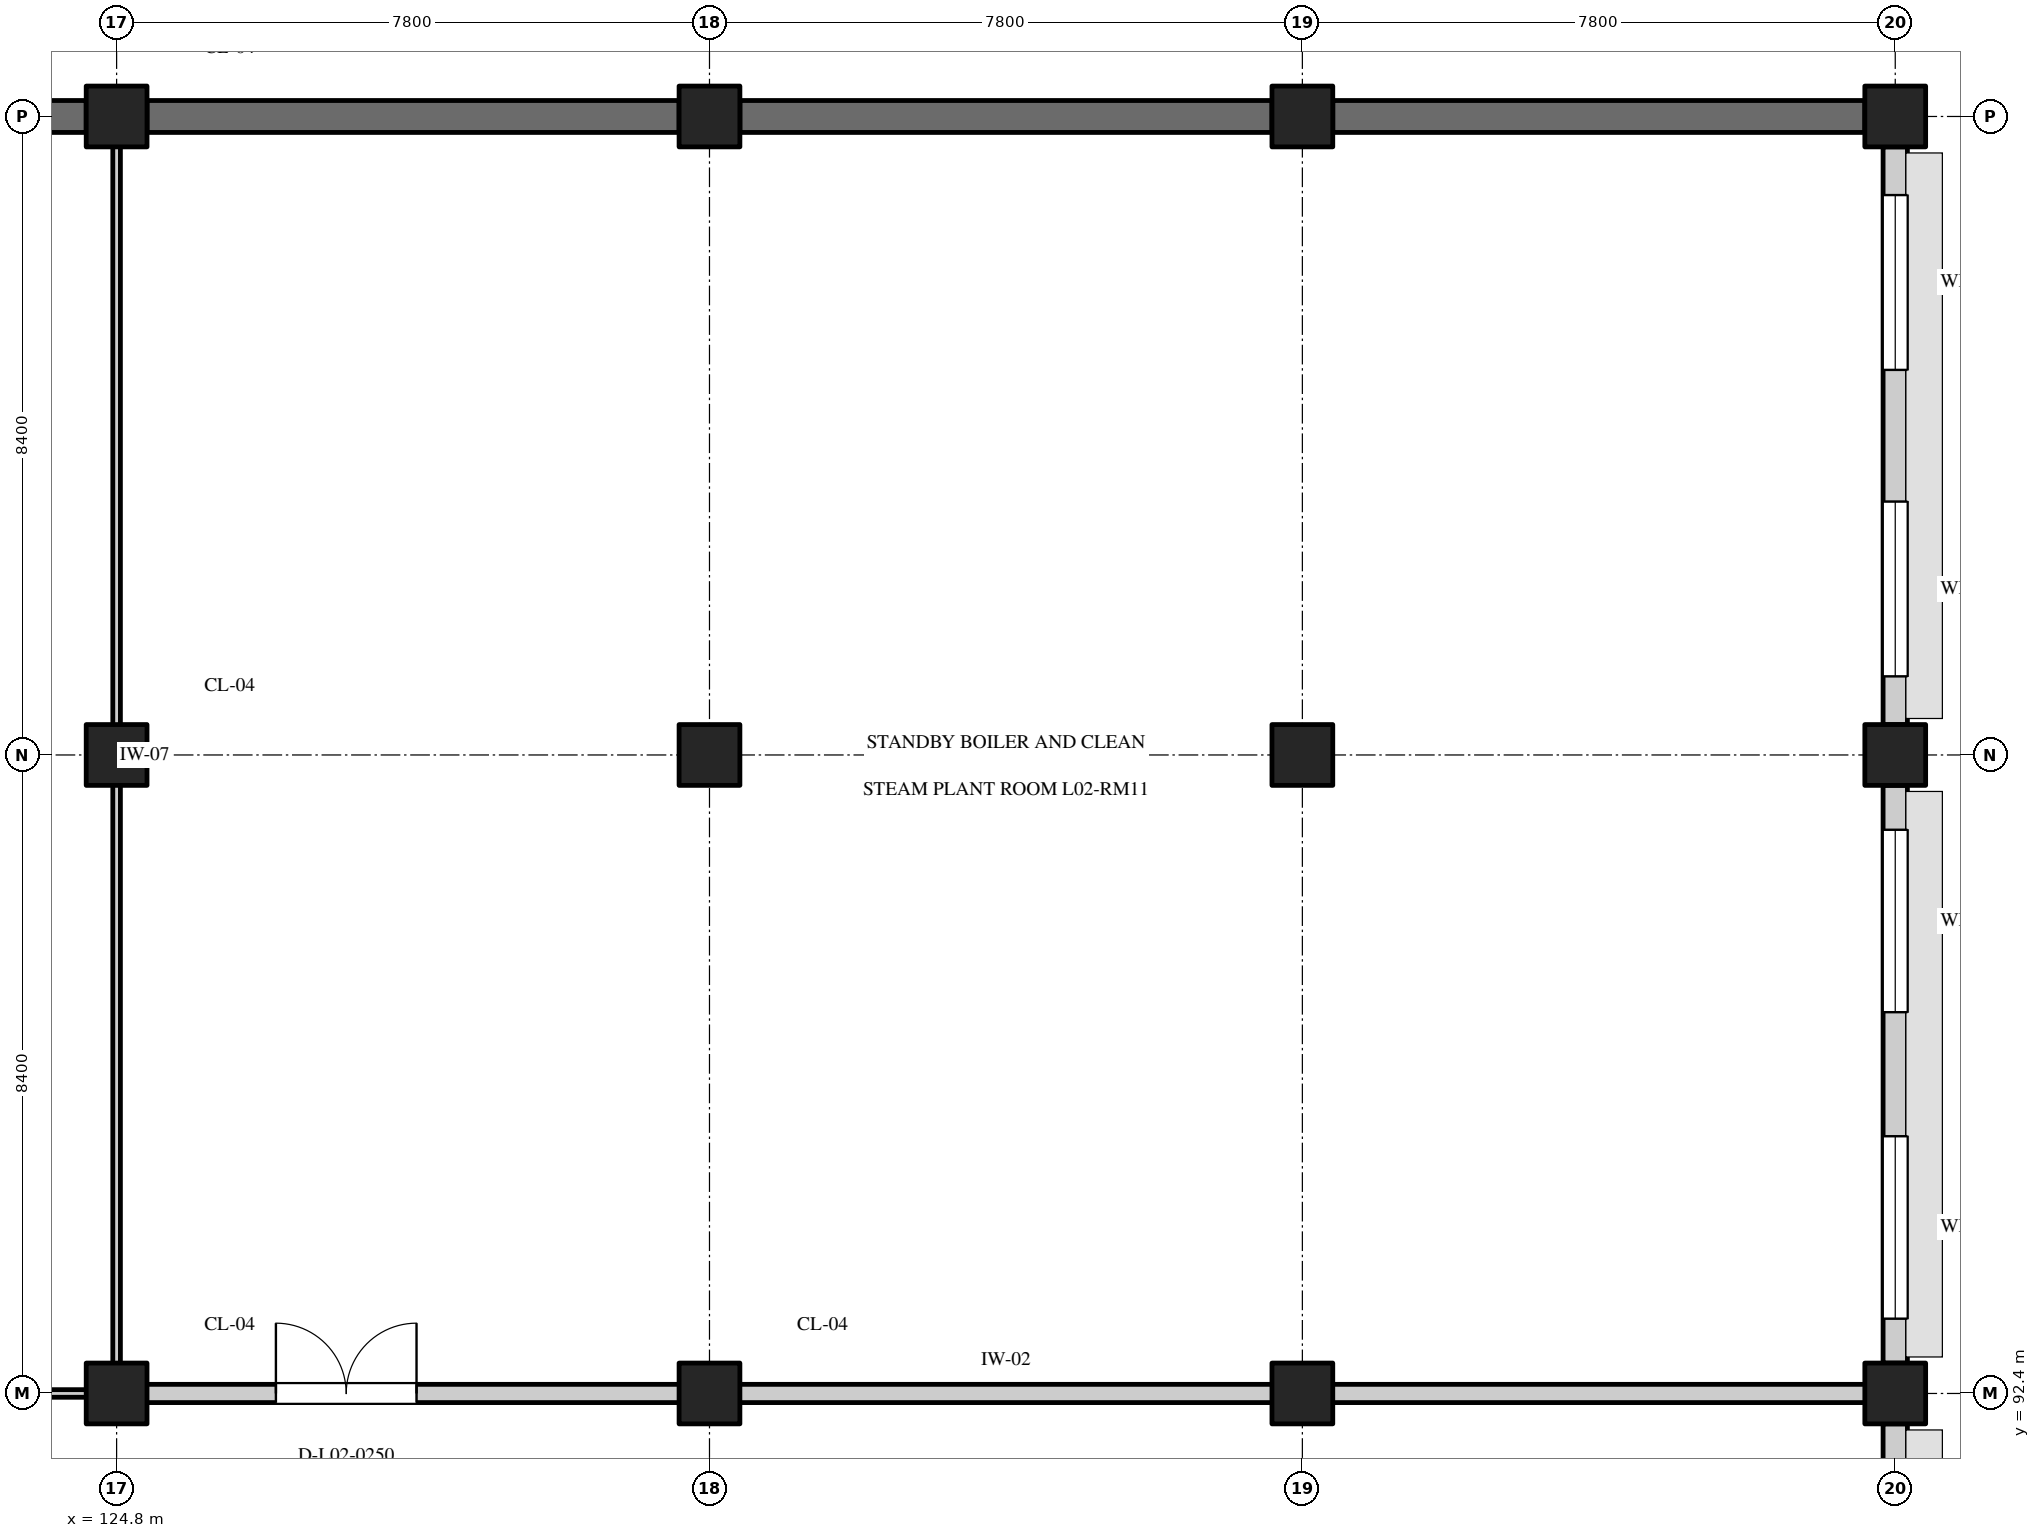
"""IFC4 building model, lengths in metres.
Left out: names, types, materials, properties, quantities, classifications, styles, units other than length and angle.
Written with IfcOpenShell. Run it as: python <this file> out.ifc"""

import sys

from ifc_helpers import new_model, si_unit, direction, frame, frame_2d, origin, origin_2d, place, context, subcontext, project, spatial, rectangle, extrude, element, fill, save


model = new_model("IFC4")
c1 = context("Model", 3, precision=1e-05, world=origin(), true_north=direction((0.0, 1.0)))
c2 = subcontext(c1, "Body", "Model", "MODEL_VIEW")
j1 = project(units=[si_unit("LENGTHUNIT", "METRE"), si_unit("PLANEANGLEUNIT", "RADIAN")], contexts=[c1])
p1 = place(None, origin())
s1 = spatial("IfcSite", under=j1, at=p1, CompositionType="ELEMENT")
p2 = place(p1, origin())
s2 = spatial("IfcBuilding", under=s1, at=p2, CompositionType="ELEMENT")
p3 = place(p2, frame((0.0, 0.0, 9.6)))
s3 = spatial("IfcBuildingStorey", under=s2, at=p3, CompositionType="ELEMENT", Elevation=9.6)
for number, where, z_axis, x_axis in (
    (1, (124.8, 92.4, 0.0), (0.0, 0.0, 1.0), (1.0, 0.0, 0.0)),
    (2, (124.8, 100.8, 0.0), (0.0, 0.0, 1.0), (1.0, 0.0, 0.0)),
    (3, (124.8, 109.2, 0.0), (0.0, 0.0, 1.0), (1.0, 0.0, 0.0)),
    (4, (132.6, 92.4, 0.0), (0.0, 0.0, 1.0), (1.0, 0.0, 0.0)),
    (5, (132.6, 100.8, 0.0), (0.0, 0.0, 1.0), (1.0, 0.0, 0.0)),
    (6, (132.6, 109.2, 0.0), (0.0, 0.0, 1.0), (1.0, 0.0, 0.0)),
    (7, (140.4, 92.4, 0.0), (0.0, 0.0, 1.0), (1.0, 0.0, 0.0)),
    (8, (140.4, 100.8, 0.0), (0.0, 0.0, 1.0), (1.0, 0.0, 0.0)),
    (9, (140.4, 109.2, 0.0), (0.0, 0.0, 1.0), (1.0, 0.0, 0.0)),
    (10, (148.2, 92.4, 0.0), (0.0, 0.0, 1.0), (1.0, 0.0, 0.0)),
    (11, (148.2, 100.8, 0.0), (0.0, 0.0, 1.0), (1.0, 0.0, 0.0)),
    (12, (148.2, 109.2, 0.0), (0.0, 0.0, 1.0), (1.0, 0.0, 0.0)),
):
    element("IfcColumn", number, at=place(p3, frame(where, z_axis=z_axis, x_axis=x_axis)), inside=s3, PredefinedType="COLUMN", context=c2, shape_type="SweptSolid", body=[
        extrude(rectangle(XDim=0.8, YDim=0.8, at=origin_2d()), origin(), (0.0, 0.0, 1.0), 4.8),
    ])
p4 = place(p3, frame((117.4, 109.2, 0.0), z_axis=(0.0, 0.0, 1.0), x_axis=(1.0, 0.0, 0.0)))
e13 = element("IfcWall", 13, at=p4, inside=s3, PredefinedType="SOLIDWALL", context=c2, shape_type="SweptSolid", body=[
    extrude(rectangle(XDim=7.0, YDim=0.42, at=frame_2d((3.5, 0.0))), origin(), (0.0, 0.0, 1.0), 3.8),
])
p5 = place(p4, frame((0.628, 0.0, 0.75)))
e14 = element("IfcOpeningElement", 14, at=p5, cuts=e13, PredefinedType="OPENING", context=c2, shape_type="SweptSolid", body=[
    extrude(rectangle(XDim=2.0, YDim=1.55, at=frame_2d((1.0, 0.775))), frame((0.0, 0.222, 0.0), z_axis=(0.0, -1.0, 0.0), x_axis=(1.0, 0.0, 0.0)), (0.0, 0.0, 1.0), 0.444),
])
p6 = place(p4, frame((4.372, 0.0, 0.75)))
e15 = element("IfcOpeningElement", 15, at=p6, cuts=e13, PredefinedType="OPENING", context=c2, shape_type="SweptSolid", body=[
    extrude(rectangle(XDim=2.0, YDim=1.55, at=frame_2d((1.0, 0.775))), frame((0.0, 0.222, 0.0), z_axis=(0.0, -1.0, 0.0), x_axis=(1.0, 0.0, 0.0)), (0.0, 0.0, 1.0), 0.444),
])
for number, where, z_axis, x_axis in (
    (16, (125.2, 109.2, 0.0), (0.0, 0.0, 1.0), (1.0, 0.0, 0.0)),
    (17, (133.0, 109.2, 0.0), (0.0, 0.0, 1.0), (1.0, 0.0, 0.0)),
    (18, (140.8, 109.2, 0.0), (0.0, 0.0, 1.0), (1.0, 0.0, 0.0)),
):
    element("IfcWall", number, at=place(p3, frame(where, z_axis=z_axis, x_axis=x_axis)), inside=s3, PredefinedType="SOLIDWALL", context=c2, shape_type="SweptSolid", body=[
        extrude(rectangle(XDim=7.0, YDim=0.42, at=frame_2d((3.5, 0.0))), origin(), (0.0, 0.0, 1.0), 3.8),
    ])
p7 = place(p3, frame((148.2, 84.4, 0.0), z_axis=(0.0, 0.0, 1.0), x_axis=(0.0, 1.0, 0.0)))
e19 = element("IfcWall", 19, at=p7, inside=s3, PredefinedType="STANDARD", context=c2, shape_type="SweptSolid", body=[
    extrude(rectangle(XDim=7.6, YDim=0.32, at=frame_2d((3.8, 0.0))), origin(), (0.0, 0.0, 1.0), 3.8),
])
p8 = place(p7, frame((0.784, 0.0, 0.75)))
e20 = element("IfcOpeningElement", 20, at=p8, cuts=e19, PredefinedType="OPENING", context=c2, shape_type="SweptSolid", body=[
    extrude(rectangle(XDim=2.0, YDim=1.45, at=frame_2d((1.0, 0.725))), frame((0.0, 0.172, 0.0), z_axis=(0.0, -1.0, 0.0), x_axis=(1.0, 0.0, 0.0)), (0.0, 0.0, 1.0), 0.344),
])
p9 = place(p7, frame((4.816, 0.0, 0.75)))
e21 = element("IfcOpeningElement", 21, at=p9, cuts=e19, PredefinedType="OPENING", context=c2, shape_type="SweptSolid", body=[
    extrude(rectangle(XDim=2.0, YDim=1.45, at=frame_2d((1.0, 0.725))), frame((0.0, 0.172, 0.0), z_axis=(0.0, -1.0, 0.0), x_axis=(1.0, 0.0, 0.0)), (0.0, 0.0, 1.0), 0.344),
])
p10 = place(p3, frame((148.2, 92.8, 0.0), z_axis=(0.0, 0.0, 1.0), x_axis=(0.0, 1.0, 0.0)))
e22 = element("IfcWall", 22, at=p10, inside=s3, PredefinedType="STANDARD", context=c2, shape_type="SweptSolid", body=[
    extrude(rectangle(XDim=7.6, YDim=0.32, at=frame_2d((3.8, 0.0))), origin(), (0.0, 0.0, 1.0), 3.8),
])
p11 = place(p10, frame((0.584, 0.0, 0.75)))
e23 = element("IfcOpeningElement", 23, at=p11, cuts=e22, PredefinedType="OPENING", context=c2, shape_type="SweptSolid", body=[
    extrude(rectangle(XDim=2.4, YDim=2.1, at=frame_2d((1.2, 1.05))), frame((0.0, 0.172, 0.0), z_axis=(0.0, -1.0, 0.0), x_axis=(1.0, 0.0, 0.0)), (0.0, 0.0, 1.0), 0.344),
])
p12 = place(p10, frame((4.616, 0.0, 0.75)))
e24 = element("IfcOpeningElement", 24, at=p12, cuts=e22, PredefinedType="OPENING", context=c2, shape_type="SweptSolid", body=[
    extrude(rectangle(XDim=2.4, YDim=2.1, at=frame_2d((1.2, 1.05))), frame((0.0, 0.172, 0.0), z_axis=(0.0, -1.0, 0.0), x_axis=(1.0, 0.0, 0.0)), (0.0, 0.0, 1.0), 0.344),
])
p13 = place(p3, frame((148.2, 101.2, 0.0), z_axis=(0.0, 0.0, 1.0), x_axis=(0.0, 1.0, 0.0)))
e25 = element("IfcWall", 25, at=p13, inside=s3, PredefinedType="STANDARD", context=c2, shape_type="SweptSolid", body=[
    extrude(rectangle(XDim=7.6, YDim=0.32, at=frame_2d((3.8, 0.0))), origin(), (0.0, 0.0, 1.0), 3.8),
])
p14 = place(p13, frame((0.634, 0.0, 0.75)))
e26 = element("IfcOpeningElement", 26, at=p14, cuts=e25, PredefinedType="OPENING", context=c2, shape_type="SweptSolid", body=[
    extrude(rectangle(XDim=2.3, YDim=2.05, at=frame_2d((1.15, 1.025))), frame((0.0, 0.172, 0.0), z_axis=(0.0, -1.0, 0.0), x_axis=(1.0, 0.0, 0.0)), (0.0, 0.0, 1.0), 0.344),
])
p15 = place(p13, frame((4.666, 0.0, 0.75)))
e27 = element("IfcOpeningElement", 27, at=p15, cuts=e25, PredefinedType="OPENING", context=c2, shape_type="SweptSolid", body=[
    extrude(rectangle(XDim=2.3, YDim=2.05, at=frame_2d((1.15, 1.025))), frame((0.0, 0.172, 0.0), z_axis=(0.0, -1.0, 0.0), x_axis=(1.0, 0.0, 0.0)), (0.0, 0.0, 1.0), 0.344),
])
p16 = place(p3, frame((101.485, 92.4, 0.0), z_axis=(0.0, 0.0, 1.0), x_axis=(1.0, 0.0, 0.0)))
e28 = element("IfcWall", 28, at=p16, inside=s3, PredefinedType="PARTITIONING", context=c2, shape_type="SweptSolid", body=[
    extrude(rectangle(XDim=23.23, YDim=0.1, at=frame_2d((11.615, 0.0))), origin(), (0.0, 0.0, 1.0), 3.75),
])
p17 = place(p16, frame((2.348, 0.0, 0.0)))
e29 = element("IfcOpeningElement", 29, at=p17, cuts=e28, PredefinedType="OPENING", context=c2, shape_type="SweptSolid", body=[
    extrude(rectangle(XDim=1.4, YDim=2.25, at=frame_2d((0.7, 1.125))), frame((0.0, 0.062, 0.0), z_axis=(0.0, -1.0, 0.0), x_axis=(1.0, 0.0, 0.0)), (0.0, 0.0, 1.0), 0.124),
])
p18 = place(p3, frame((124.8, 92.485, 0.0), z_axis=(0.0, 0.0, 1.0), x_axis=(0.0, 1.0, 0.0)))
e30 = element("IfcWall", 30, at=p18, inside=s3, PredefinedType="PARTITIONING", context=c2, shape_type="SweptSolid", body=[
    extrude(rectangle(XDim=16.63, YDim=0.1, at=frame_2d((8.315, 0.0))), origin(), (0.0, 0.0, 1.0), 4.48),
])
p19 = place(p3, frame((124.91, 92.4, 0.0), z_axis=(0.0, 0.0, 1.0), x_axis=(1.0, 0.0, 0.0)))
e31 = element("IfcWall", 31, at=p19, inside=s3, PredefinedType="STANDARD", context=c2, shape_type="SweptSolid", body=[
    extrude(rectangle(XDim=23.18, YDim=0.24, at=frame_2d((11.59, 0.0))), origin(), (0.0, 0.0, 1.0), 3.75),
])
p20 = place(p19, frame((1.986, 0.0, 0.0)))
e32 = element("IfcOpeningElement", 32, at=p20, cuts=e31, PredefinedType="OPENING", context=c2, shape_type="SweptSolid", body=[
    extrude(rectangle(XDim=1.85, YDim=2.3, at=frame_2d((0.925, 1.15))), frame((0.0, 0.132, 0.0), z_axis=(0.0, -1.0, 0.0), x_axis=(1.0, 0.0, 0.0)), (0.0, 0.0, 1.0), 0.264),
])
for number, where, z_axis, x_axis in (
    (33, (132.24, 109.2, 0.0), (0.0, 0.0, 1.0), (1.0, 0.0, 0.0)),
    (34, (140.04, 109.2, 0.0), (0.0, 0.0, 1.0), (1.0, 0.0, 0.0)),
    (35, (148.2, 100.44, 0.0), (0.0, 0.0, 1.0), (0.0, 1.0, 0.0)),
):
    element("IfcWall", number, at=place(p3, frame(where, z_axis=z_axis, x_axis=x_axis)), inside=s3, PredefinedType="STANDARD", context=c2, shape_type="SweptSolid", body=[
        extrude(rectangle(XDim=0.72, YDim=0.24, at=frame_2d((0.36, 0.0))), origin(), (0.0, 0.0, 1.0), 3.75),
    ])
p21 = place(p11, origin())
e36 = element("IfcWindow", 36, at=p21, inside=s3, PartitioningType="DOUBLE_PANEL_VERTICAL", PredefinedType="WINDOW", context=c2, shape_type="SweptSolid", body=[
    extrude(rectangle(XDim=2.4, YDim=2.1, at=frame_2d((1.2, 1.05))), frame((0.0, 0.03, 0.0), z_axis=(0.0, -1.0, 0.0), x_axis=(1.0, 0.0, 0.0)), (0.0, 0.0, 1.0), 0.06),
])
fill(e23, e36)
p22 = place(p12, origin())
e37 = element("IfcWindow", 37, at=p22, inside=s3, PartitioningType="DOUBLE_PANEL_VERTICAL", PredefinedType="WINDOW", context=c2, shape_type="SweptSolid", body=[
    extrude(rectangle(XDim=2.4, YDim=2.1, at=frame_2d((1.2, 1.05))), frame((0.0, 0.03, 0.0), z_axis=(0.0, -1.0, 0.0), x_axis=(1.0, 0.0, 0.0)), (0.0, 0.0, 1.0), 0.06),
])
fill(e24, e37)
p23 = place(p14, origin())
e38 = element("IfcWindow", 38, at=p23, inside=s3, PartitioningType="DOUBLE_PANEL_VERTICAL", PredefinedType="WINDOW", context=c2, shape_type="SweptSolid", body=[
    extrude(rectangle(XDim=2.3, YDim=2.05, at=frame_2d((1.15, 1.025))), frame((0.0, 0.03, 0.0), z_axis=(0.0, -1.0, 0.0), x_axis=(1.0, 0.0, 0.0)), (0.0, 0.0, 1.0), 0.06),
])
fill(e26, e38)
p24 = place(p15, origin())
e39 = element("IfcWindow", 39, at=p24, inside=s3, PartitioningType="DOUBLE_PANEL_VERTICAL", PredefinedType="WINDOW", context=c2, shape_type="SweptSolid", body=[
    extrude(rectangle(XDim=2.3, YDim=2.05, at=frame_2d((1.15, 1.025))), frame((0.0, 0.03, 0.0), z_axis=(0.0, -1.0, 0.0), x_axis=(1.0, 0.0, 0.0)), (0.0, 0.0, 1.0), 0.06),
])
fill(e27, e39)
p25 = place(p20, origin())
e40 = element("IfcDoor", 40, at=p25, inside=s3, OperationType="DOUBLE_DOOR_SINGLE_SWING", PredefinedType="DOOR", context=c2, shape_type="SweptSolid", body=[
    extrude(rectangle(XDim=1.85, YDim=2.3, at=frame_2d((0.925, 1.15))), frame((0.0, 0.025, 0.0), z_axis=(0.0, -1.0, 0.0), x_axis=(1.0, 0.0, 0.0)), (0.0, 0.0, 1.0), 0.05),
])
fill(e32, e40)
save(model, sys.argv[1])
